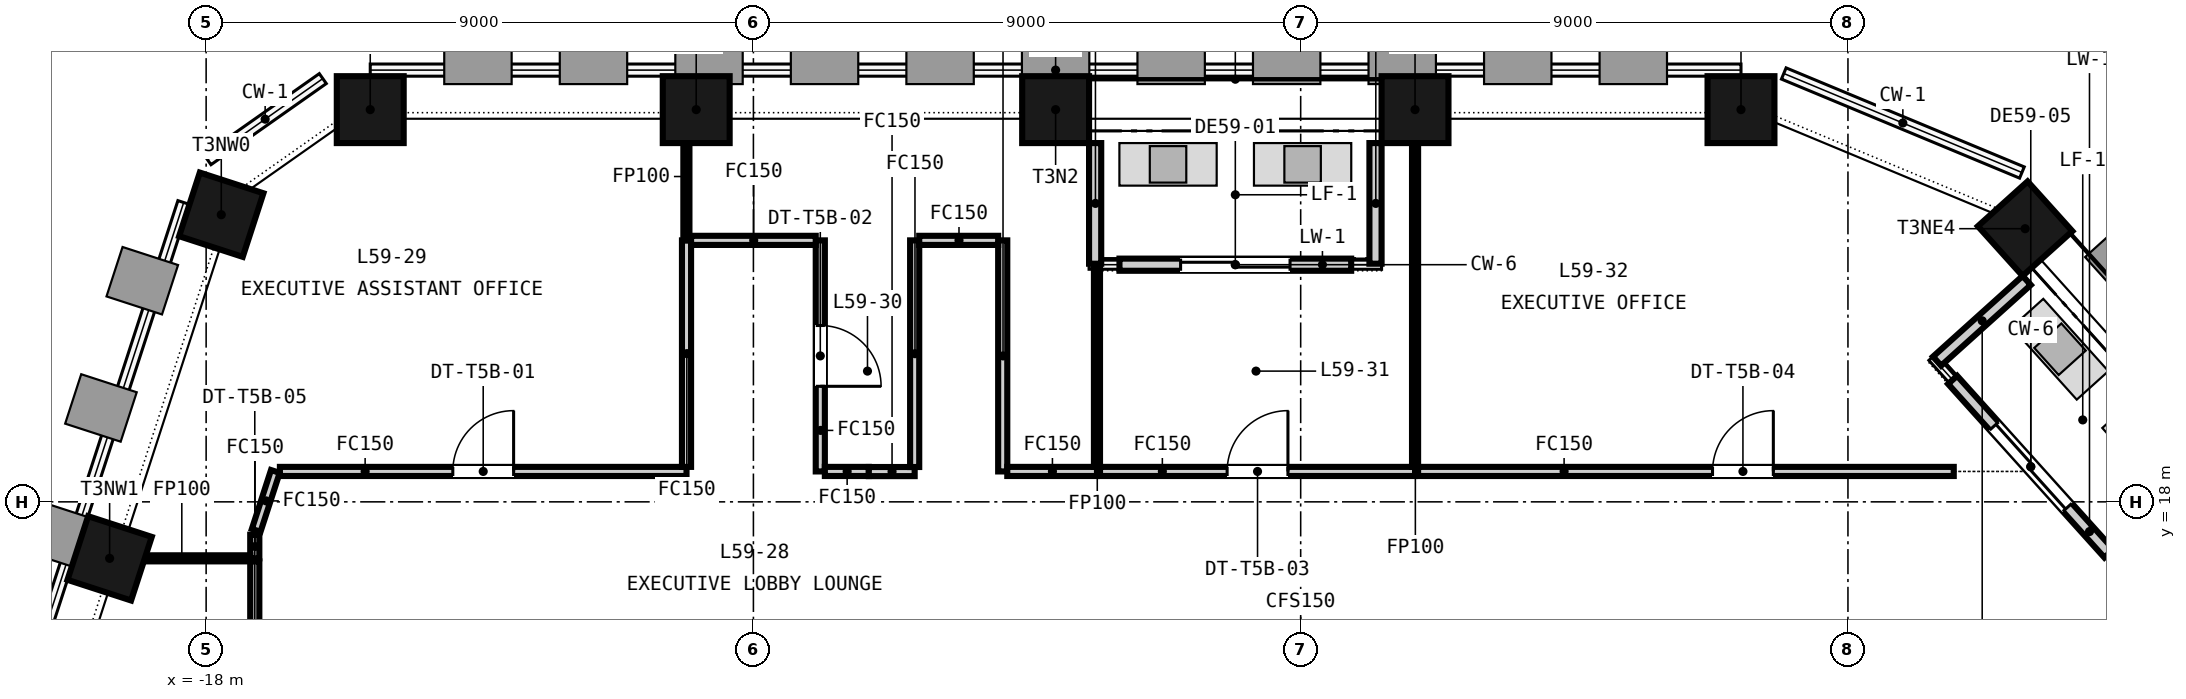
"""IFC4 building model, lengths in metres.
Left out: names, types, materials, properties, quantities, classifications, styles, units other than length and angle.
Written with IfcOpenShell. Run it as: python <this file> out.ifc"""

import sys

from ifc_helpers import new_model, si_unit, direction, frame, frame_2d, origin, origin_2d, place, context, subcontext, project, spatial, rectangle, extrude, element, fill, save


model = new_model("IFC4")
c1 = context("Model", 3, precision=1e-05, world=origin(), true_north=direction((0.0, 1.0)))
c2 = subcontext(c1, "Body", "Model", "MODEL_VIEW")
j1 = project(units=[si_unit("LENGTHUNIT", "METRE"), si_unit("PLANEANGLEUNIT", "RADIAN")], contexts=[c1])
p1 = place(None, origin())
s1 = spatial("IfcSite", under=j1, at=p1, CompositionType="ELEMENT")
p2 = place(p1, origin())
s2 = spatial("IfcBuilding", under=s1, at=p2, CompositionType="ELEMENT")
p3 = place(p2, frame((0.0, 0.0, 234.55)))
s3 = spatial("IfcBuildingStorey", under=s2, at=p3, CompositionType="ELEMENT", Elevation=234.55)
for number, where, z_axis, x_axis in (
    (1, (7.241, 24.45, -0.15), (0.0, 0.0, 1.0), (-1.0, 0.0, 0.0)),
    (2, (1.881, 24.45, -0.15), (0.0, 0.0, 1.0), (-1.0, 0.0, 0.0)),
    (3, (-4.03, 24.45, -0.15), (0.0, 0.0, 1.0), (-1.0, 0.0, 0.0)),
    (4, (-9.941, 24.45, -0.15), (0.0, 0.0, 1.0), (-1.0, 0.0, 0.0)),
    (5, (-15.301, 24.45, -0.15), (0.0, 0.0, 1.0), (-1.0, 0.0, 0.0)),
    (6, (-17.751, 22.722, -0.15), (0.0, 0.0, 1.0), (-0.309, -0.951, 0.0)),
    (7, (-19.587, 17.071, -0.15), (0.0, 0.0, 1.0), (-0.309, -0.951, 0.0)),
    (8, (11.914, 22.492, -0.15), (0.0, 0.0, 1.0), (-0.669, 0.743, 0.0)),
):
    element("IfcColumn", number, at=place(p3, frame(where, z_axis=z_axis, x_axis=x_axis)), inside=s3, PredefinedType="COLUMN", context=c2, shape_type="SweptSolid", body=[
        extrude(rectangle(XDim=1.1, YDim=1.1, at=origin_2d()), origin(), (0.0, 0.0, 1.0), 3.65),
    ])
p4 = place(p3, frame((0.831, 21.9, 0.0), z_axis=(0.0, 0.0, 1.0), x_axis=(-1.0, 0.0, 0.0)))
e9 = element("IfcWall", 9, at=p4, inside=s3, PredefinedType="SOLIDWALL", context=c2, shape_type="SweptSolid", body=[
    extrude(rectangle(XDim=3.811, YDim=0.2, at=frame_2d((1.905, 0.0))), origin(), (0.0, 0.0, 1.0), 2.897),
])
p5 = place(p4, frame((1.005, 0.0, 0.0)))
e10 = element("IfcOpeningElement", 10, at=p5, cuts=e9, PredefinedType="OPENING", context=c2, shape_type="SweptSolid", body=[
    extrude(rectangle(XDim=1.8, YDim=2.4, at=frame_2d((0.9, 1.2))), frame((0.0, 0.11, 0.0), z_axis=(0.0, -1.0, 0.0), x_axis=(1.0, 0.0, 0.0)), (0.0, 0.0, 1.0), 0.22),
])
for number, where, z_axis, x_axis in (
    (11, (1.23, 23.9, 0.0), (0.0, 0.0, 1.0), (0.0, -1.0, 0.0)),
    (12, (-3.38, 23.9, 0.0), (0.0, 0.0, 1.0), (0.0, -1.0, 0.0)),
):
    element("IfcWall", number, at=place(p3, frame(where, z_axis=z_axis, x_axis=x_axis)), inside=s3, PredefinedType="SOLIDWALL", context=c2, shape_type="SweptSolid", body=[
        extrude(rectangle(XDim=1.984, YDim=0.2, at=frame_2d((0.992, 0.0))), origin(), (0.0, 0.0, 1.0), 3.05),
    ])
p6 = place(p3, frame((13.292, 17.15, 0.0), z_axis=(0.0, 0.0, 1.0), x_axis=(-0.66915429884, 0.743123491988, 0.0)))
e13 = element("IfcWall", 13, at=p6, inside=s3, PredefinedType="SOLIDWALL", context=c2, shape_type="SweptSolid", body=[
    extrude(rectangle(XDim=3.842, YDim=0.2, at=frame_2d((1.921, 0.0))), origin(), (0.0, 0.0, 1.0), 3.05),
])
p7 = place(p6, frame((1.021, 0.0, 0.0)))
e14 = element("IfcOpeningElement", 14, at=p7, cuts=e13, PredefinedType="OPENING", context=c2, shape_type="SweptSolid", body=[
    extrude(rectangle(XDim=1.8, YDim=2.4, at=frame_2d((0.9, 1.2))), frame((0.0, 0.11, 0.0), z_axis=(0.0, -1.0, 0.0), x_axis=(1.0, 0.0, 0.0)), (0.0, 0.0, 1.0), 0.22),
])
p8 = place(p3, frame((11.94, 21.641, 0.0), z_axis=(0.0, 0.0, 1.0), x_axis=(-0.743171771917, -0.669100678094, 0.0)))
e15 = element("IfcWall", 15, at=p8, inside=s3, PredefinedType="SOLIDWALL", context=c2, shape_type="SweptSolid", body=[
    extrude(rectangle(XDim=1.984, YDim=0.2, at=frame_2d((0.992, 0.0))), origin(), (0.0, 0.0, 1.0), 3.05),
])
p9 = place(p3, frame((-7.9, 22.3, 0.0), z_axis=(0.0, 0.0, 1.0), x_axis=(0.0, -1.0, 0.0)))
e16 = element("IfcWall", 16, at=p9, inside=s3, PredefinedType="PARTITIONING", context=c2, shape_type="SweptSolid", body=[
    extrude(rectangle(XDim=3.8, YDim=0.15, at=frame_2d((1.9, 0.0))), origin(), (0.0, 0.0, 1.0), 2.751),
])
p10 = place(p9, frame((1.4, 0.0, 0.0)))
e17 = element("IfcOpeningElement", 17, at=p10, cuts=e16, PredefinedType="OPENING", context=c2, shape_type="SweptSolid", body=[
    extrude(rectangle(XDim=1.0, YDim=2.1, at=frame_2d((0.5, 1.05))), frame((0.0, 0.085, 0.0), z_axis=(0.0, -1.0, 0.0), x_axis=(1.0, 0.0, 0.0)), (0.0, 0.0, 1.0), 0.17),
])
p11 = place(p3, frame((-4.9, 22.3, 0.0), z_axis=(0.0, 0.0, 1.0), x_axis=(0.0, -1.0, 0.0)))
e18 = element("IfcWall", 18, at=p11, inside=s3, PredefinedType="PARTITIONING", context=c2, shape_type="SweptSolid", body=[
    extrude(rectangle(XDim=3.8, YDim=0.15, at=frame_2d((1.9, 0.0))), origin(), (0.0, 0.0, 1.0), 2.751),
])
p12 = place(p3, frame((-17.2, 17.071, 0.0), z_axis=(0.0, 0.0, 1.0), x_axis=(0.0, 1.0, 0.0)))
e19 = element("IfcWall", 19, at=p12, inside=s3, PredefinedType="PARTITIONING", context=c2, shape_type="SweptSolid", body=[
    extrude(rectangle(XDim=0.389, YDim=0.15, at=frame_2d((0.194, 0.0))), origin(), (0.0, 0.0, 1.0), 2.751),
])
p13 = place(p3, frame((-17.177, 17.531, 0.0), z_axis=(0.0, 0.0, 1.0), x_axis=(0.30895599646, 0.951076333556, 0.0)))
e20 = element("IfcWall", 20, at=p13, inside=s3, PredefinedType="PARTITIONING", context=c2, shape_type="SweptSolid", body=[
    extrude(rectangle(XDim=1.019, YDim=0.15, at=frame_2d((0.509, 0.0))), origin(), (0.0, 0.0, 1.0), 2.751),
])
p14 = place(p3, frame((-16.787, 18.5, 0.0), z_axis=(0.0, 0.0, 1.0), x_axis=(1.0, 0.0, 0.0)))
e21 = element("IfcWall", 21, at=p14, inside=s3, PredefinedType="PARTITIONING", context=c2, shape_type="SweptSolid", body=[
    extrude(rectangle(XDim=6.687, YDim=0.15, at=frame_2d((3.344, 0.0))), origin(), (0.0, 0.0, 1.0), 2.751),
])
p15 = place(p14, frame((2.844, 0.0, 0.0)))
e22 = element("IfcOpeningElement", 22, at=p15, cuts=e21, PredefinedType="OPENING", context=c2, shape_type="SweptSolid", body=[
    extrude(rectangle(XDim=1.0, YDim=2.1, at=frame_2d((0.5, 1.05))), frame((0.0, 0.085, 0.0), z_axis=(0.0, -1.0, 0.0), x_axis=(1.0, 0.0, 0.0)), (0.0, 0.0, 1.0), 0.17),
])
p16 = place(p3, frame((-10.1, 18.575, 0.0), z_axis=(0.0, 0.0, 1.0), x_axis=(0.0, 1.0, 0.0)))
e23 = element("IfcWall", 23, at=p16, inside=s3, PredefinedType="PARTITIONING", context=c2, shape_type="SweptSolid", body=[
    extrude(rectangle(XDim=3.725, YDim=0.15, at=frame_2d((1.863, 0.0))), origin(), (0.0, 0.0, 1.0), 2.751),
])
p17 = place(p3, frame((-10.102, 22.3, 0.0), z_axis=(0.0, 0.0, 1.0), x_axis=(0.0, 1.0, 0.0)))
e24 = element("IfcWall", 24, at=p17, inside=s3, PredefinedType="PARTITIONING", context=c2, shape_type="SweptSolid", body=[
    extrude(rectangle(XDim=2.1, YDim=0.1, at=frame_2d((1.05, 0.0))), origin(), (0.0, 0.0, 1.0), 2.751),
])
p18 = place(p3, frame((-19.535, 17.071, 0.0), z_axis=(0.0, 0.0, 1.0), x_axis=(1.0, 0.0, 0.0)))
e25 = element("IfcWall", 25, at=p18, inside=s3, PredefinedType="PARTITIONING", context=c2, shape_type="SweptSolid", body=[
    extrude(rectangle(XDim=2.26, YDim=0.1, at=frame_2d((1.13, 0.0))), origin(), (0.0, 0.0, 1.0), 2.751),
])
p19 = place(p3, frame((-10.025, 22.3, 0.0), z_axis=(0.0, 0.0, 1.0), x_axis=(1.0, 0.0, 0.0)))
e26 = element("IfcWall", 26, at=p19, inside=s3, PredefinedType="PARTITIONING", context=c2, shape_type="SweptSolid", body=[
    extrude(rectangle(XDim=2.05, YDim=0.15, at=frame_2d((1.025, 0.0))), origin(), (0.0, 0.0, 1.0), 2.751),
])
p20 = place(p3, frame((-7.825, 18.5, 0.0), z_axis=(0.0, 0.0, 1.0), x_axis=(1.0, 0.0, 0.0)))
e27 = element("IfcWall", 27, at=p20, inside=s3, PredefinedType="PARTITIONING", context=c2, shape_type="SweptSolid", body=[
    extrude(rectangle(XDim=0.723, YDim=0.15, at=frame_2d((0.361, 0.0))), origin(), (0.0, 0.0, 1.0), 2.751),
])
p21 = place(p3, frame((-7.102, 18.498, 0.0), z_axis=(0.0, 0.0, 1.0), x_axis=(1.0, 0.0, 0.0)))
e28 = element("IfcWall", 28, at=p21, inside=s3, PredefinedType="PARTITIONING", context=c2, shape_type="SweptSolid", body=[
    extrude(rectangle(XDim=0.754, YDim=0.15, at=frame_2d((0.377, 0.0))), origin(), (0.0, 0.0, 1.0), 2.751),
])
p22 = place(p3, frame((-6.348, 18.573, 0.0), z_axis=(0.0, 0.0, 1.0), x_axis=(0.0, 1.0, 0.0)))
e29 = element("IfcWall", 29, at=p22, inside=s3, PredefinedType="PARTITIONING", context=c2, shape_type="SweptSolid", body=[
    extrude(rectangle(XDim=3.727, YDim=0.15, at=frame_2d((1.864, 0.0))), origin(), (0.0, 0.0, 1.0), 2.751),
])
p23 = place(p3, frame((-6.273, 22.3, 0.0), z_axis=(0.0, 0.0, 1.0), x_axis=(1.0, 0.0, 0.0)))
e30 = element("IfcWall", 30, at=p23, inside=s3, PredefinedType="PARTITIONING", context=c2, shape_type="SweptSolid", body=[
    extrude(rectangle(XDim=1.298, YDim=0.15, at=frame_2d((0.649, 0.0))), origin(), (0.0, 0.0, 1.0), 2.751),
])
p24 = place(p3, frame((-4.825, 18.5, 0.0), z_axis=(0.0, 0.0, 1.0), x_axis=(1.0, 0.0, 0.0)))
e31 = element("IfcWall", 31, at=p24, inside=s3, PredefinedType="PARTITIONING", context=c2, shape_type="SweptSolid", body=[
    extrude(rectangle(XDim=1.475, YDim=0.15, at=frame_2d((0.737, 0.0))), origin(), (0.0, 0.0, 1.0), 2.751),
])
p25 = place(p3, frame((-3.35, 18.575, 0.0), z_axis=(0.0, 0.0, 1.0), x_axis=(0.0, 1.0, 0.0)))
e32 = element("IfcWall", 32, at=p25, inside=s3, PredefinedType="PARTITIONING", context=c2, shape_type="SweptSolid", body=[
    extrude(rectangle(XDim=3.279, YDim=0.1, at=frame_2d((1.64, 0.0))), origin(), (0.0, 0.0, 1.0), 2.751),
])
p26 = place(p3, frame((-3.3, 18.5, 0.0), z_axis=(0.0, 0.0, 1.0), x_axis=(1.0, 0.0, 0.0)))
e33 = element("IfcWall", 33, at=p26, inside=s3, PredefinedType="PARTITIONING", context=c2, shape_type="SweptSolid", body=[
    extrude(rectangle(XDim=5.181, YDim=0.15, at=frame_2d((2.591, 0.0))), origin(), (0.0, 0.0, 1.0), 2.751),
])
p27 = place(p26, frame((2.091, 0.0, 0.0)))
e34 = element("IfcOpeningElement", 34, at=p27, cuts=e33, PredefinedType="OPENING", context=c2, shape_type="SweptSolid", body=[
    extrude(rectangle(XDim=1.0, YDim=2.1, at=frame_2d((0.5, 1.05))), frame((0.0, 0.085, 0.0), z_axis=(0.0, -1.0, 0.0), x_axis=(1.0, 0.0, 0.0)), (0.0, 0.0, 1.0), 0.17),
])
p28 = place(p3, frame((1.881, 18.575, 0.0), z_axis=(0.0, 0.0, 1.0), x_axis=(0.0, 1.0, 0.0)))
e35 = element("IfcWall", 35, at=p28, inside=s3, PredefinedType="PARTITIONING", context=c2, shape_type="SweptSolid", body=[
    extrude(rectangle(XDim=5.825, YDim=0.1, at=frame_2d((2.913, 0.0))), origin(), (0.0, 0.0, 1.0), 2.751),
])
p29 = place(p3, frame((1.931, 18.5, 0.0), z_axis=(0.0, 0.0, 1.0), x_axis=(1.0, 0.0, 0.0)))
e36 = element("IfcWall", 36, at=p29, inside=s3, PredefinedType="PARTITIONING", context=c2, shape_type="SweptSolid", body=[
    extrude(rectangle(XDim=8.809, YDim=0.15, at=frame_2d((4.405, 0.0))), origin(), (0.0, 0.0, 1.0), 2.751),
])
p30 = place(p29, frame((4.842, 0.0, 0.0)))
e37 = element("IfcOpeningElement", 37, at=p30, cuts=e36, PredefinedType="OPENING", context=c2, shape_type="SweptSolid", body=[
    extrude(rectangle(XDim=1.0, YDim=2.1, at=frame_2d((0.5, 1.05))), frame((0.0, 0.085, 0.0), z_axis=(0.0, -1.0, 0.0), x_axis=(1.0, 0.0, 0.0)), (0.0, 0.0, 1.0), 0.17),
])
p31 = place(p3, frame((-17.2, 10.897, 0.0), z_axis=(0.0, 0.0, 1.0), x_axis=(0.0, 1.0, 0.0)))
e38 = element("IfcWall", 38, at=p31, inside=s3, PredefinedType="PARTITIONING", context=c2, shape_type="SweptSolid", body=[
    extrude(rectangle(XDim=6.124, YDim=0.15, at=frame_2d((3.062, 0.0))), origin(), (0.0, 0.0, 1.0), 2.751),
])
p32 = place(p31, frame((2.562, 0.0, 0.0)))
e39 = element("IfcOpeningElement", 39, at=p32, cuts=e38, PredefinedType="OPENING", context=c2, shape_type="SweptSolid", body=[
    extrude(rectangle(XDim=1.0, YDim=2.1, at=frame_2d((0.5, 1.05))), frame((0.0, 0.085, 0.0), z_axis=(0.0, -1.0, 0.0), x_axis=(1.0, 0.0, 0.0)), (0.0, 0.0, 1.0), 0.17),
])
p33 = place(p5, origin())
e40 = element("IfcDoor", 40, at=p33, inside=s3, OperationType="SINGLE_SWING_LEFT", PredefinedType="DOOR", context=c2, shape_type="SweptSolid", body=[
    extrude(rectangle(XDim=1.8, YDim=2.4, at=frame_2d((0.9, 1.2))), frame((0.0, 0.025, 0.0), z_axis=(0.0, -1.0, 0.0), x_axis=(1.0, 0.0, 0.0)), (0.0, 0.0, 1.0), 0.05),
])
fill(e10, e40)
p34 = place(p7, origin())
e41 = element("IfcDoor", 41, at=p34, inside=s3, OperationType="SINGLE_SWING_LEFT", PredefinedType="DOOR", context=c2, shape_type="SweptSolid", body=[
    extrude(rectangle(XDim=1.8, YDim=2.4, at=frame_2d((0.9, 1.2))), frame((0.0, 0.025, 0.0), z_axis=(0.0, -1.0, 0.0), x_axis=(1.0, 0.0, 0.0)), (0.0, 0.0, 1.0), 0.05),
])
fill(e14, e41)
p35 = place(p15, origin())
e42 = element("IfcDoor", 42, at=p35, inside=s3, OperationType="SINGLE_SWING_RIGHT", PredefinedType="DOOR", context=c2, shape_type="SweptSolid", body=[
    extrude(rectangle(XDim=1.0, YDim=2.1, at=frame_2d((0.5, 1.05))), frame((0.0, 0.025, 0.0), z_axis=(0.0, -1.0, 0.0), x_axis=(1.0, 0.0, 0.0)), (0.0, 0.0, 1.0), 0.05),
])
fill(e22, e42)
p36 = place(p10, origin())
e43 = element("IfcDoor", 43, at=p36, inside=s3, OperationType="SINGLE_SWING_RIGHT", PredefinedType="DOOR", context=c2, shape_type="SweptSolid", body=[
    extrude(rectangle(XDim=1.0, YDim=2.1, at=frame_2d((0.5, 1.05))), frame((0.0, 0.025, 0.0), z_axis=(0.0, -1.0, 0.0), x_axis=(1.0, 0.0, 0.0)), (0.0, 0.0, 1.0), 0.05),
])
fill(e17, e43)
p37 = place(p27, origin())
e44 = element("IfcDoor", 44, at=p37, inside=s3, OperationType="SINGLE_SWING_RIGHT", PredefinedType="DOOR", context=c2, shape_type="SweptSolid", body=[
    extrude(rectangle(XDim=1.0, YDim=2.1, at=frame_2d((0.5, 1.05))), frame((0.0, 0.025, 0.0), z_axis=(0.0, -1.0, 0.0), x_axis=(1.0, 0.0, 0.0)), (0.0, 0.0, 1.0), 0.05),
])
fill(e34, e44)
p38 = place(p30, origin())
e45 = element("IfcDoor", 45, at=p38, inside=s3, OperationType="SINGLE_SWING_RIGHT", PredefinedType="DOOR", context=c2, shape_type="SweptSolid", body=[
    extrude(rectangle(XDim=1.0, YDim=2.1, at=frame_2d((0.5, 1.05))), frame((0.0, 0.025, 0.0), z_axis=(0.0, -1.0, 0.0), x_axis=(1.0, 0.0, 0.0)), (0.0, 0.0, 1.0), 0.05),
])
fill(e37, e45)
save(model, sys.argv[1])
